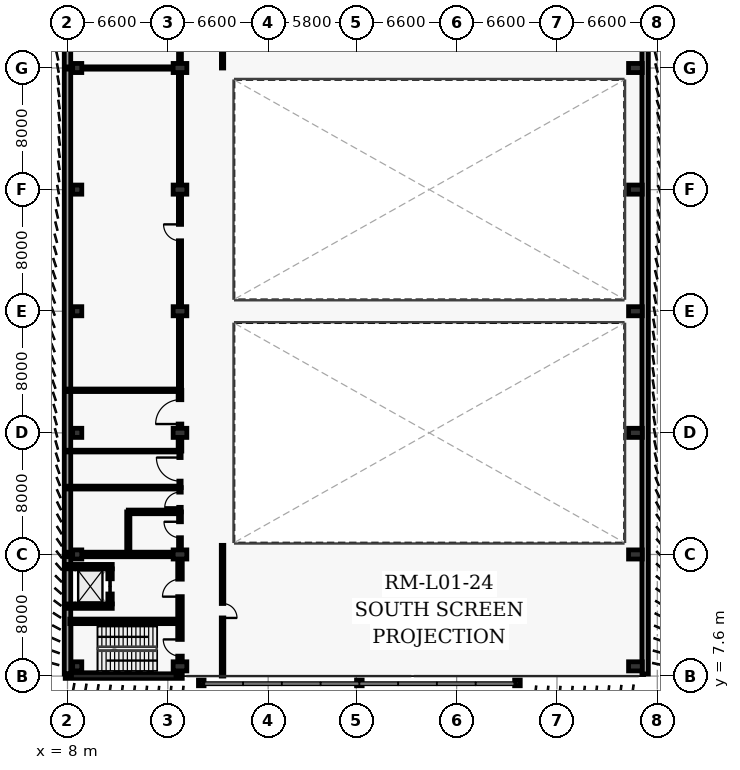
"""IFC4 building model, lengths in metres.
Left out: names, types, materials, properties, quantities, classifications, styles, units other than length and angle.
Written with IfcOpenShell. Run it as: python <this file> out.ifc"""

import sys

from ifc_helpers import new_model, si_unit, direction, frame, frame_2d, origin, origin_2d, place, context, subcontext, project, spatial, rectangle, i_section, extrude, element, fill, save


model = new_model("IFC4")
c1 = context("Model", 3, precision=1e-05, world=origin(), true_north=direction((0.0, 1.0)))
c2 = subcontext(c1, "Body", "Model", "MODEL_VIEW")
j1 = project(units=[si_unit("LENGTHUNIT", "METRE"), si_unit("PLANEANGLEUNIT", "RADIAN")], contexts=[c1])
p1 = place(None, origin())
s1 = spatial("IfcSite", under=j1, at=p1, CompositionType="ELEMENT")
p2 = place(p1, origin())
s2 = spatial("IfcBuilding", under=s1, at=p2, CompositionType="ELEMENT")
p3 = place(p2, frame((0.0, 0.0, 5.4)))
s3 = spatial("IfcBuildingStorey", under=s2, at=p3, CompositionType="ELEMENT", Elevation=5.4)
for number, where, z_axis, x_axis in (
    (1, (8.64, 8.24, 0.0), (0.0, 0.0, 1.0), (1.0, 0.0, 0.0)),
    (2, (8.64, 15.6, 0.0), (0.0, 0.0, 1.0), (1.0, 0.0, 0.0)),
    (3, (8.64, 23.6, 0.0), (0.0, 0.0, 1.0), (1.0, 0.0, 0.0)),
    (4, (8.64, 31.6, 0.0), (0.0, 0.0, 1.0), (1.0, 0.0, 0.0)),
    (5, (8.64, 39.6, 0.0), (0.0, 0.0, 1.0), (1.0, 0.0, 0.0)),
    (6, (8.64, 47.6, 0.0), (0.0, 0.0, 1.0), (1.0, 0.0, 0.0)),
):
    element("IfcColumn", number, at=place(p3, frame(where, z_axis=z_axis, x_axis=x_axis)), inside=s3, PredefinedType="COLUMN", context=c2, shape_type="SweptSolid", body=[
        extrude(rectangle(XDim=0.6, YDim=0.6, at=origin_2d()), origin(), (0.0, 0.0, 1.0), 4.8),
    ])
for number, where, z_axis, x_axis in (
    (7, (15.4, 8.24, 0.0), (0.0, 0.0, 1.0), (1.0, 0.0, 0.0)),
    (8, (15.4, 15.6, 0.0), (0.0, 0.0, 1.0), (1.0, 0.0, 0.0)),
    (9, (15.4, 23.6, 0.0), (0.0, 0.0, 1.0), (1.0, 0.0, 0.0)),
    (10, (15.4, 31.6, 0.0), (0.0, 0.0, 1.0), (1.0, 0.0, 0.0)),
    (11, (15.4, 39.6, 0.0), (0.0, 0.0, 1.0), (1.0, 0.0, 0.0)),
    (12, (15.4, 47.6, 0.0), (0.0, 0.0, 1.0), (1.0, 0.0, 0.0)),
    (13, (45.36, 8.24, 0.0), (0.0, 0.0, 1.0), (1.0, 0.0, 0.0)),
    (14, (45.36, 15.6, 0.0), (0.0, 0.0, 1.0), (1.0, 0.0, 0.0)),
    (15, (45.36, 23.6, 0.0), (0.0, 0.0, 1.0), (1.0, 0.0, 0.0)),
    (16, (45.36, 31.6, 0.0), (0.0, 0.0, 1.0), (1.0, 0.0, 0.0)),
    (17, (45.36, 39.6, 0.0), (0.0, 0.0, 1.0), (1.0, 0.0, 0.0)),
    (18, (45.36, 47.6, 0.0), (0.0, 0.0, 1.0), (1.0, 0.0, 0.0)),
):
    element("IfcColumn", number, at=place(p3, frame(where, z_axis=z_axis, x_axis=x_axis)), inside=s3, PredefinedType="COLUMN", context=c2, shape_type="SweptSolid", body=[
        extrude(rectangle(XDim=0.6, YDim=0.9, at=origin_2d()), origin(), (0.0, 0.0, 1.0), 4.8),
    ])
for number, where, z_axis, x_axis in (
    (19, (16.8, 7.15, 0.0), (0.0, 0.0, 1.0), (1.0, 0.0, 0.0)),
    (20, (27.2, 7.15, 0.0), (0.0, 0.0, 1.0), (1.0, 0.0, 0.0)),
    (21, (37.6, 7.15, 0.0), (0.0, 0.0, 1.0), (1.0, 0.0, 0.0)),
):
    element("IfcColumn", number, at=place(p3, frame(where, z_axis=z_axis, x_axis=x_axis)), inside=s3, PredefinedType="COLUMN", context=c2, shape_type="SweptSolid", body=[
        extrude(i_section(OverallWidth=0.373, OverallDepth=0.368, WebThickness=0.014, FlangeThickness=0.024, at=origin_2d()), origin(), (0.0, 0.0, 1.0), 4.8),
    ])
for number, where, z_axis, x_axis in (
    (22, (46.0, 63.46, 0.0), (0.0, 0.0, 1.0), (0.0, -1.0, 0.0)),
    (23, (8.0, 7.74, 0.0), (0.0, 0.0, 1.0), (0.0, 1.0, 0.0)),
):
    element("IfcWall", number, at=place(p3, frame(where, z_axis=z_axis, x_axis=x_axis)), inside=s3, PredefinedType="SOLIDWALL", context=c2, shape_type="SweptSolid", body=[
        extrude(rectangle(XDim=55.72, YDim=0.425, at=frame_2d((27.86, 0.0))), origin(), (0.0, 0.0, 1.0), 4.52),
    ])
p4 = place(p3, frame((7.85, 7.6, 0.0), z_axis=(0.0, 0.0, 1.0), x_axis=(1.0, 0.0, 0.0)))
e24 = element("IfcWall", 24, at=p4, inside=s3, PredefinedType="SHEAR", context=c2, shape_type="SweptSolid", body=[
    extrude(rectangle(XDim=7.7, YDim=0.3, at=frame_2d((3.85, 0.0))), origin(), (0.0, 0.0, 1.0), 4.52),
])
p5 = place(p3, frame((7.85, 15.6, 0.0), z_axis=(0.0, 0.0, 1.0), x_axis=(1.0, 0.0, 0.0)))
e25 = element("IfcWall", 25, at=p5, inside=s3, PredefinedType="SHEAR", context=c2, shape_type="SweptSolid", body=[
    extrude(rectangle(XDim=7.248, YDim=0.3, at=frame_2d((3.624, 0.0))), origin(), (0.0, 0.0, 1.0), 4.52),
])
p6 = place(p3, frame((15.4, 8.692, 0.0), z_axis=(0.0, 0.0, 1.0), x_axis=(0.0, 1.0, 0.0)))
e26 = element("IfcWall", 26, at=p6, inside=s3, PredefinedType="SHEAR", context=c2, shape_type="SweptSolid", body=[
    extrude(rectangle(XDim=6.456, YDim=0.3, at=frame_2d((3.228, 0.0))), origin(), (0.0, 0.0, 1.0), 4.52),
])
p7 = place(p6, frame((0.22, 0.0, 0.0)))
e27 = element("IfcOpeningElement", 27, at=p7, cuts=e26, PredefinedType="OPENING", context=c2, shape_type="SweptSolid", body=[
    extrude(rectangle(XDim=1.1, YDim=2.15, at=frame_2d((0.55, 1.075))), frame((0.0, 0.16, 0.0), z_axis=(0.0, -1.0, 0.0), x_axis=(1.0, 0.0, 0.0)), (0.0, 0.0, 1.0), 0.32),
])
p8 = place(p6, frame((4.133, 0.0, 0.0)))
e28 = element("IfcOpeningElement", 28, at=p8, cuts=e26, PredefinedType="OPENING", context=c2, shape_type="SweptSolid", body=[
    extrude(rectangle(XDim=1.15, YDim=2.2, at=frame_2d((0.575, 1.1))), frame((0.0, 0.16, 0.0), z_axis=(0.0, -1.0, 0.0), x_axis=(1.0, 0.0, 0.0)), (0.0, 0.0, 1.0), 0.32),
])
p9 = place(p3, frame((8.15, 11.2, 0.0), z_axis=(0.0, 0.0, 1.0), x_axis=(1.0, 0.0, 0.0)))
e29 = element("IfcWall", 29, at=p9, inside=s3, PredefinedType="SHEAR", context=c2, shape_type="SweptSolid", body=[
    extrude(rectangle(XDim=7.1, YDim=0.3, at=frame_2d((3.55, 0.0))), origin(), (0.0, 0.0, 1.0), 4.52),
])
for number, where, z_axis, x_axis in (
    (30, (8.055, 12.2, 0.0), (0.0, 0.0, 1.0), (1.0, 0.0, 0.0)),
    (31, (8.055, 14.8, 0.0), (0.0, 0.0, 1.0), (1.0, 0.0, 0.0)),
):
    element("IfcWall", number, at=place(p3, frame(where, z_axis=z_axis, x_axis=x_axis)), inside=s3, PredefinedType="SHEAR", context=c2, shape_type="SweptSolid", body=[
        extrude(rectangle(XDim=2.89, YDim=0.29, at=frame_2d((1.445, 0.0))), origin(), (0.0, 0.0, 1.0), 4.52),
    ])
p10 = place(p3, frame((10.8, 12.345, 0.0), z_axis=(0.0, 0.0, 1.0), x_axis=(0.0, 1.0, 0.0)))
e32 = element("IfcWall", 32, at=p10, inside=s3, PredefinedType="SHEAR", context=c2, shape_type="SweptSolid", body=[
    extrude(rectangle(XDim=2.31, YDim=0.29, at=frame_2d((1.155, 0.0))), origin(), (0.0, 0.0, 1.0), 4.52),
])
p11 = place(p10, frame((0.655, 0.0, 0.0)))
e33 = element("IfcOpeningElement", 33, at=p11, cuts=e32, PredefinedType="OPENING", context=c2, shape_type="SweptSolid", body=[
    extrude(rectangle(XDim=1.0, YDim=2.15, at=frame_2d((0.5, 1.075))), frame((0.0, 0.155, 0.0), z_axis=(0.0, -1.0, 0.0), x_axis=(1.0, 0.0, 0.0)), (0.0, 0.0, 1.0), 0.31),
])
p12 = place(p3, frame((15.4, 16.052, 0.0), z_axis=(0.0, 0.0, 1.0), x_axis=(0.0, 1.0, 0.0)))
e34 = element("IfcWall", 34, at=p12, inside=s3, PredefinedType="PARTITIONING", context=c2, shape_type="SweptSolid", body=[
    extrude(rectangle(XDim=2.348, YDim=0.19, at=frame_2d((1.174, 0.0))), origin(), (0.0, 0.0, 1.0), 3.67),
])
p13 = place(p12, frame((0.649, 0.0, 0.0)))
e35 = element("IfcOpeningElement", 35, at=p13, cuts=e34, PredefinedType="OPENING", context=c2, shape_type="SweptSolid", body=[
    extrude(rectangle(XDim=1.05, YDim=2.15, at=frame_2d((0.525, 1.075))), frame((0.0, 0.105, 0.0), z_axis=(0.0, -1.0, 0.0), x_axis=(1.0, 0.0, 0.0)), (0.0, 0.0, 1.0), 0.21),
])
p14 = place(p3, frame((15.4, 18.4, 0.0), z_axis=(0.0, 0.0, 1.0), x_axis=(0.0, 1.0, 0.0)))
e36 = element("IfcWall", 36, at=p14, inside=s3, PredefinedType="PARTITIONING", context=c2, shape_type="SweptSolid", body=[
    extrude(rectangle(XDim=1.6, YDim=0.165, at=frame_2d((0.8, 0.0))), origin(), (0.0, 0.0, 1.0), 3.67),
])
p15 = place(p14, frame((0.3, 0.0, 0.0)))
e37 = element("IfcOpeningElement", 37, at=p15, cuts=e36, PredefinedType="OPENING", context=c2, shape_type="SweptSolid", body=[
    extrude(rectangle(XDim=1.0, YDim=2.1, at=frame_2d((0.5, 1.05))), frame((0.0, 0.093, 0.0), z_axis=(0.0, -1.0, 0.0), x_axis=(1.0, 0.0, 0.0)), (0.0, 0.0, 1.0), 0.185),
])
p16 = place(p3, frame((15.4, 20.0, 0.0), z_axis=(0.0, 0.0, 1.0), x_axis=(0.0, 1.0, 0.0)))
e38 = element("IfcWall", 38, at=p16, inside=s3, PredefinedType="PARTITIONING", context=c2, shape_type="SweptSolid", body=[
    extrude(rectangle(XDim=2.4, YDim=0.15, at=frame_2d((1.2, 0.0))), origin(), (0.0, 0.0, 1.0), 3.67),
])
p17 = place(p16, frame((0.425, 0.0, 0.0)))
e39 = element("IfcOpeningElement", 39, at=p17, cuts=e38, PredefinedType="OPENING", context=c2, shape_type="SweptSolid", body=[
    extrude(rectangle(XDim=1.55, YDim=2.25, at=frame_2d((0.775, 1.125))), frame((0.0, 0.085, 0.0), z_axis=(0.0, -1.0, 0.0), x_axis=(1.0, 0.0, 0.0)), (0.0, 0.0, 1.0), 0.17),
])
p18 = place(p3, frame((15.4, 22.4, 0.0), z_axis=(0.0, 0.0, 1.0), x_axis=(0.0, 1.0, 0.0)))
e40 = element("IfcWall", 40, at=p18, inside=s3, PredefinedType="PARTITIONING", context=c2, shape_type="SweptSolid", body=[
    extrude(rectangle(XDim=4.0, YDim=0.24, at=frame_2d((2.0, 0.0))), origin(), (0.0, 0.0, 1.0), 3.67),
])
p19 = place(p18, frame((1.78, 0.0, 0.0)))
e41 = element("IfcOpeningElement", 41, at=p19, cuts=e40, PredefinedType="OPENING", context=c2, shape_type="SweptSolid", body=[
    extrude(rectangle(XDim=1.6, YDim=2.3, at=frame_2d((0.8, 1.15))), frame((0.0, 0.13, 0.0), z_axis=(0.0, -1.0, 0.0), x_axis=(1.0, 0.0, 0.0)), (0.0, 0.0, 1.0), 0.26),
])
p20 = place(p3, frame((15.4, 26.4, 0.0), z_axis=(0.0, 0.0, 1.0), x_axis=(0.0, 1.0, 0.0)))
e42 = element("IfcWall", 42, at=p20, inside=s3, PredefinedType="PARTITIONING", context=c2, shape_type="SweptSolid", body=[
    extrude(rectangle(XDim=20.748, YDim=0.21, at=frame_2d((10.374, 0.0))), origin(), (0.0, 0.0, 1.0), 3.67),
])
p21 = place(p20, frame((9.834, 0.0, 0.0)))
e43 = element("IfcOpeningElement", 43, at=p21, cuts=e42, PredefinedType="OPENING", context=c2, shape_type="SweptSolid", body=[
    extrude(rectangle(XDim=1.08, YDim=2.15, at=frame_2d((0.54, 1.075))), frame((0.0, 0.115, 0.0), z_axis=(0.0, -1.0, 0.0), x_axis=(1.0, 0.0, 0.0)), (0.0, 0.0, 1.0), 0.23),
])
p22 = place(p3, frame((15.4, 48.052, 0.0), z_axis=(0.0, 0.0, 1.0), x_axis=(0.0, 1.0, 0.0)))
e44 = element("IfcWall", 44, at=p22, inside=s3, PredefinedType="PARTITIONING", context=c2, shape_type="SweptSolid", body=[
    extrude(rectangle(XDim=15.548, YDim=0.19, at=frame_2d((7.774, 0.0))), origin(), (0.0, 0.0, 1.0), 3.67),
])
p23 = place(p22, frame((8.38, 0.0, 0.0)))
e45 = element("IfcOpeningElement", 45, at=p23, cuts=e44, PredefinedType="OPENING", context=c2, shape_type="SweptSolid", body=[
    extrude(rectangle(XDim=0.92, YDim=2.1, at=frame_2d((0.46, 1.05))), frame((0.0, 0.105, 0.0), z_axis=(0.0, -1.0, 0.0), x_axis=(1.0, 0.0, 0.0)), (0.0, 0.0, 1.0), 0.21),
])
p24 = place(p3, frame((18.2, 16.2, 0.0), z_axis=(0.0, 0.0, 1.0), x_axis=(0.0, -1.0, 0.0)))
e46 = element("IfcWall", 46, at=p24, inside=s3, PredefinedType="PARTITIONING", context=c2, shape_type="SweptSolid", body=[
    extrude(rectangle(XDim=8.6, YDim=0.165, at=frame_2d((4.3, 0.0))), origin(), (0.0, 0.0, 1.0), 4.52),
])
p25 = place(p24, frame((3.825, 0.0, 0.0)))
e47 = element("IfcOpeningElement", 47, at=p25, cuts=e46, PredefinedType="OPENING", context=c2, shape_type="SweptSolid", body=[
    extrude(rectangle(XDim=0.95, YDim=2.1, at=frame_2d((0.475, 1.05))), frame((0.0, 0.093, 0.0), z_axis=(0.0, -1.0, 0.0), x_axis=(1.0, 0.0, 0.0)), (0.0, 0.0, 1.0), 0.185),
])
p26 = place(p3, frame((18.2, 63.6, 0.0), z_axis=(0.0, 0.0, 1.0), x_axis=(0.0, -1.0, 0.0)))
e48 = element("IfcWall", 48, at=p26, inside=s3, PredefinedType="PARTITIONING", context=c2, shape_type="SweptSolid", body=[
    extrude(rectangle(XDim=16.0, YDim=0.15, at=frame_2d((8.0, 0.0))), origin(), (0.0, 0.0, 1.0), 4.52),
])
p27 = place(p26, frame((5.98, 0.0, 0.0)))
e49 = element("IfcOpeningElement", 49, at=p27, cuts=e48, PredefinedType="OPENING", context=c2, shape_type="SweptSolid", body=[
    extrude(rectangle(XDim=1.12, YDim=2.15, at=frame_2d((0.56, 1.075))), frame((0.0, 0.085, 0.0), z_axis=(0.0, -1.0, 0.0), x_axis=(1.0, 0.0, 0.0)), (0.0, 0.0, 1.0), 0.17),
])
p28 = place(p26, frame((11.92, 0.0, 0.0)))
e50 = element("IfcOpeningElement", 50, at=p28, cuts=e48, PredefinedType="OPENING", context=c2, shape_type="SweptSolid", body=[
    extrude(rectangle(XDim=1.12, YDim=2.15, at=frame_2d((0.56, 1.075))), frame((0.0, 0.085, 0.0), z_axis=(0.0, -1.0, 0.0), x_axis=(1.0, 0.0, 0.0)), (0.0, 0.0, 1.0), 0.17),
])
p29 = place(p3, frame((12.0, 18.4, 0.0), z_axis=(0.0, 0.0, 1.0), x_axis=(1.0, 0.0, 0.0)))
e51 = element("IfcWall", 51, at=p29, inside=s3, PredefinedType="PARTITIONING", context=c2, shape_type="SweptSolid", body=[
    extrude(rectangle(XDim=3.4, YDim=0.24, at=frame_2d((1.7, 0.0))), origin(), (0.0, 0.0, 1.0), 4.52),
])
p30 = place(p3, frame((12.0, 15.6, 0.0), z_axis=(0.0, 0.0, 1.0), x_axis=(0.0, 1.0, 0.0)))
e52 = element("IfcWall", 52, at=p30, inside=s3, PredefinedType="PARTITIONING", context=c2, shape_type="SweptSolid", body=[
    extrude(rectangle(XDim=2.8, YDim=0.21, at=frame_2d((1.4, 0.0))), origin(), (0.0, 0.0, 1.0), 4.52),
])
p31 = place(p3, frame((8.0, 20.0, 0.0), z_axis=(0.0, 0.0, 1.0), x_axis=(1.0, 0.0, 0.0)))
e53 = element("IfcWall", 53, at=p31, inside=s3, PredefinedType="PARTITIONING", context=c2, shape_type="SweptSolid", body=[
    extrude(rectangle(XDim=7.4, YDim=0.19, at=frame_2d((3.7, 0.0))), origin(), (0.0, 0.0, 1.0), 4.52),
])
p32 = place(p3, frame((8.0, 22.4, 0.0), z_axis=(0.0, 0.0, 1.0), x_axis=(1.0, 0.0, 0.0)))
e54 = element("IfcWall", 54, at=p32, inside=s3, PredefinedType="PARTITIONING", context=c2, shape_type="SweptSolid", body=[
    extrude(rectangle(XDim=7.4, YDim=0.115, at=frame_2d((3.7, 0.0))), origin(), (0.0, 0.0, 1.0), 4.52),
])
p33 = place(p3, frame((8.0, 26.4, 0.0), z_axis=(0.0, 0.0, 1.0), x_axis=(1.0, 0.0, 0.0)))
e55 = element("IfcWall", 55, at=p33, inside=s3, PredefinedType="PARTITIONING", context=c2, shape_type="SweptSolid", body=[
    extrude(rectangle(XDim=7.4, YDim=0.165, at=frame_2d((3.7, 0.0))), origin(), (0.0, 0.0, 1.0), 4.52),
])
p34 = place(p3, frame((8.0, 47.6, 0.0), z_axis=(0.0, 0.0, 1.0), x_axis=(1.0, 0.0, 0.0)))
e56 = element("IfcWall", 56, at=p34, inside=s3, PredefinedType="PARTITIONING", context=c2, shape_type="SweptSolid", body=[
    extrude(rectangle(XDim=7.098, YDim=0.15, at=frame_2d((3.549, 0.0))), origin(), (0.0, 0.0, 1.0), 3.87),
])
p35 = place(p7, origin())
e57 = element("IfcDoor", 57, at=p35, inside=s3, OperationType="SINGLE_SWING_RIGHT", PredefinedType="DOOR", context=c2, shape_type="SweptSolid", body=[
    extrude(rectangle(XDim=1.1, YDim=2.15, at=frame_2d((0.55, 1.075))), frame((0.0, 0.025, 0.0), z_axis=(0.0, -1.0, 0.0), x_axis=(1.0, 0.0, 0.0)), (0.0, 0.0, 1.0), 0.05),
])
fill(e27, e57)
p36 = place(p8, origin())
e58 = element("IfcDoor", 58, at=p36, inside=s3, OperationType="SINGLE_SWING_LEFT", PredefinedType="DOOR", context=c2, shape_type="SweptSolid", body=[
    extrude(rectangle(XDim=1.15, YDim=2.2, at=frame_2d((0.575, 1.1))), frame((0.0, 0.025, 0.0), z_axis=(0.0, -1.0, 0.0), x_axis=(1.0, 0.0, 0.0)), (0.0, 0.0, 1.0), 0.05),
])
fill(e28, e58)
p37 = place(p11, origin())
e59 = element("IfcDoor", 59, at=p37, inside=s3, OperationType="SLIDING_TO_LEFT", PredefinedType="DOOR", context=c2, shape_type="SweptSolid", body=[
    extrude(rectangle(XDim=1.0, YDim=2.15, at=frame_2d((0.5, 1.075))), frame((0.0, 0.025, 0.0), z_axis=(0.0, -1.0, 0.0), x_axis=(1.0, 0.0, 0.0)), (0.0, 0.0, 1.0), 0.05),
])
fill(e33, e59)
p38 = place(p13, origin())
e60 = element("IfcDoor", 60, at=p38, inside=s3, OperationType="SINGLE_SWING_RIGHT", PredefinedType="DOOR", context=c2, shape_type="SweptSolid", body=[
    extrude(rectangle(XDim=1.05, YDim=2.15, at=frame_2d((0.525, 1.075))), frame((0.0, 0.025, 0.0), z_axis=(0.0, -1.0, 0.0), x_axis=(1.0, 0.0, 0.0)), (0.0, 0.0, 1.0), 0.05),
])
fill(e35, e60)
p39 = place(p15, origin())
e61 = element("IfcDoor", 61, at=p39, inside=s3, OperationType="SINGLE_SWING_LEFT", PredefinedType="DOOR", context=c2, shape_type="SweptSolid", body=[
    extrude(rectangle(XDim=1.0, YDim=2.1, at=frame_2d((0.5, 1.05))), frame((0.0, 0.025, 0.0), z_axis=(0.0, -1.0, 0.0), x_axis=(1.0, 0.0, 0.0)), (0.0, 0.0, 1.0), 0.05),
])
fill(e37, e61)
p40 = place(p17, origin())
e62 = element("IfcDoor", 62, at=p40, inside=s3, OperationType="SINGLE_SWING_RIGHT", PredefinedType="DOOR", context=c2, shape_type="SweptSolid", body=[
    extrude(rectangle(XDim=1.55, YDim=2.25, at=frame_2d((0.775, 1.125))), frame((0.0, 0.025, 0.0), z_axis=(0.0, -1.0, 0.0), x_axis=(1.0, 0.0, 0.0)), (0.0, 0.0, 1.0), 0.05),
])
fill(e39, e62)
p41 = place(p19, origin())
e63 = element("IfcDoor", 63, at=p41, inside=s3, OperationType="SINGLE_SWING_LEFT", PredefinedType="DOOR", context=c2, shape_type="SweptSolid", body=[
    extrude(rectangle(XDim=1.6, YDim=2.3, at=frame_2d((0.8, 1.15))), frame((0.0, 0.025, 0.0), z_axis=(0.0, -1.0, 0.0), x_axis=(1.0, 0.0, 0.0)), (0.0, 0.0, 1.0), 0.05),
])
fill(e41, e63)
p42 = place(p21, origin())
e64 = element("IfcDoor", 64, at=p42, inside=s3, OperationType="SINGLE_SWING_RIGHT", PredefinedType="DOOR", context=c2, shape_type="SweptSolid", body=[
    extrude(rectangle(XDim=1.08, YDim=2.15, at=frame_2d((0.54, 1.075))), frame((0.0, 0.025, 0.0), z_axis=(0.0, -1.0, 0.0), x_axis=(1.0, 0.0, 0.0)), (0.0, 0.0, 1.0), 0.05),
])
fill(e43, e64)
p43 = place(p25, origin())
e65 = element("IfcDoor", 65, at=p43, inside=s3, OperationType="SINGLE_SWING_RIGHT", PredefinedType="DOOR", context=c2, shape_type="SweptSolid", body=[
    extrude(rectangle(XDim=0.95, YDim=2.1, at=frame_2d((0.475, 1.05))), frame((0.0, 0.025, 0.0), z_axis=(0.0, -1.0, 0.0), x_axis=(1.0, 0.0, 0.0)), (0.0, 0.0, 1.0), 0.05),
])
fill(e47, e65)
save(model, sys.argv[1])
